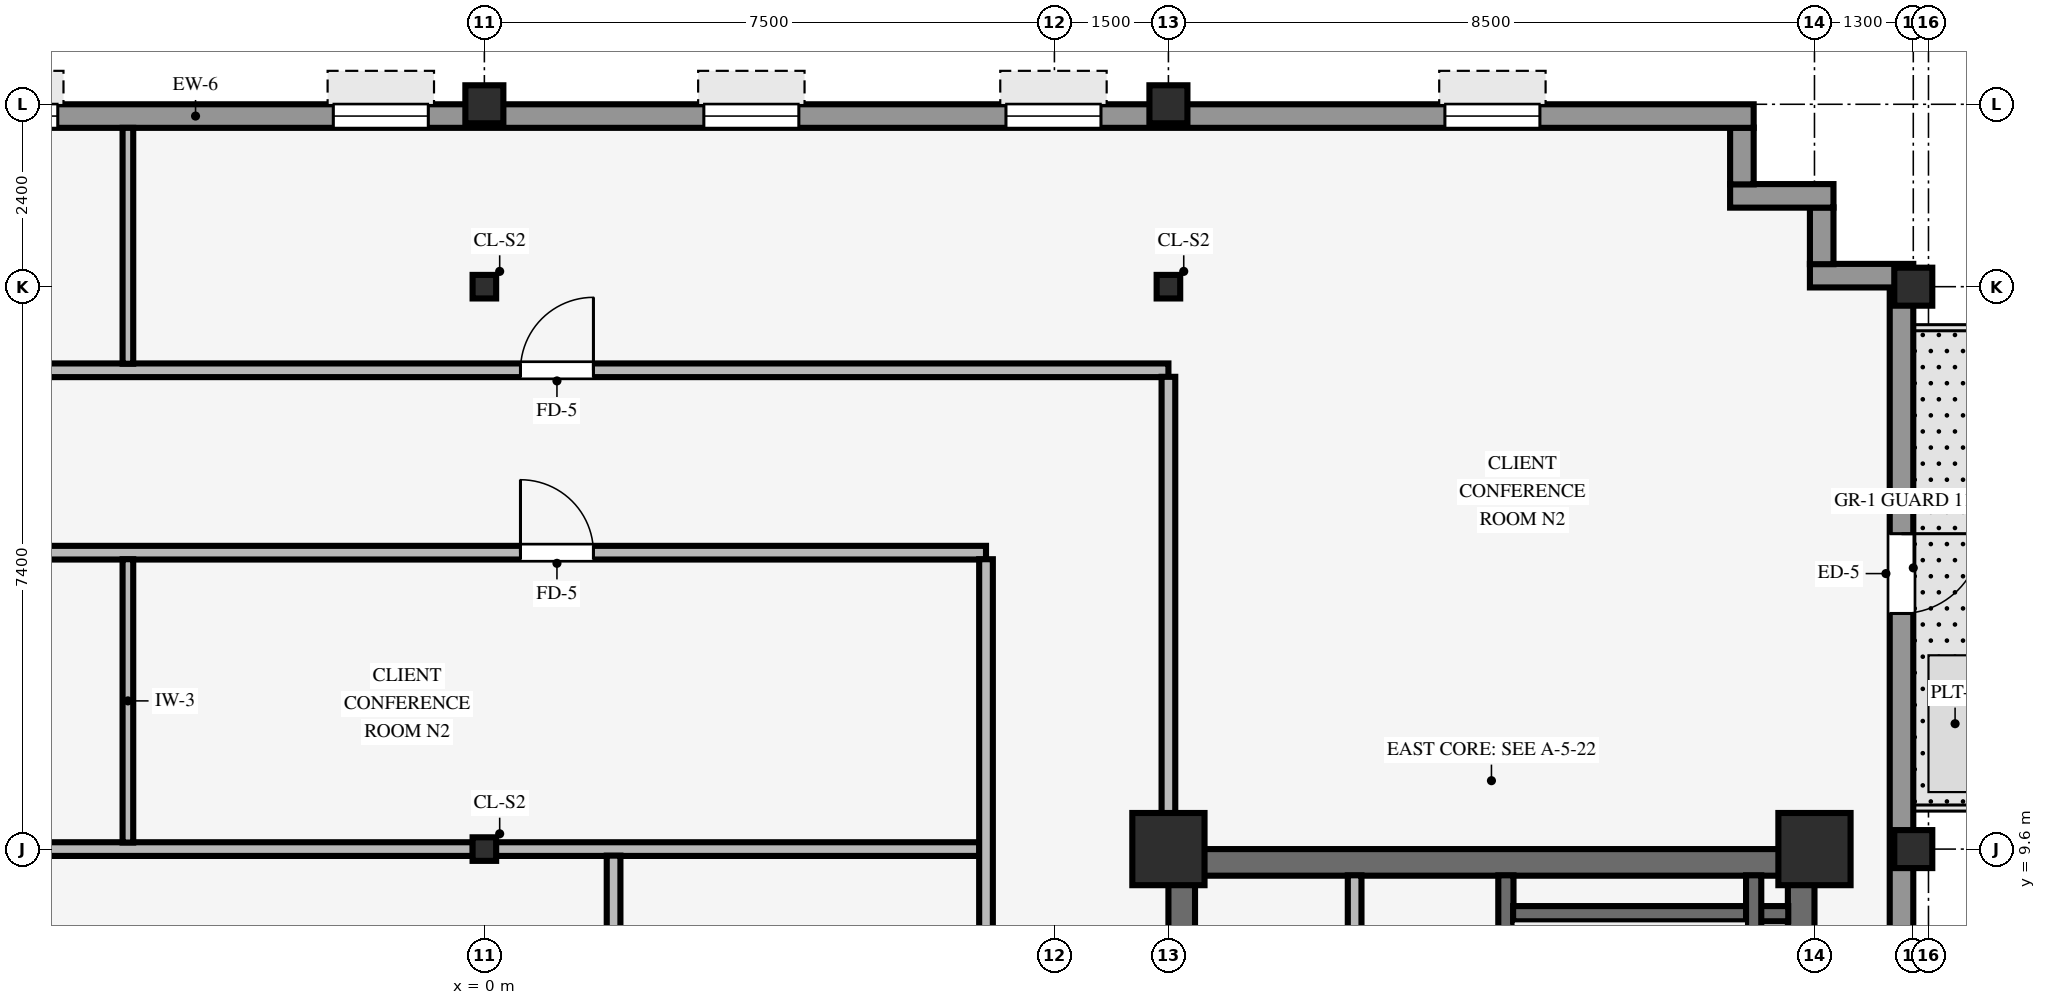
"""IFC4 building model, lengths in metres.
Left out: names, types, materials, properties, quantities, classifications, styles, units other than length and angle.
Written with IfcOpenShell. Run it as: python <this file> out.ifc"""

import sys

from ifc_helpers import new_model, si_unit, direction, frame, frame_2d, origin, origin_2d, place, context, subcontext, project, spatial, rectangle, hollow_rectangle, i_section, extrude, source, transform, mapped, element, fill, save


model = new_model("IFC4")
c1 = context("Model", 3, precision=1e-05, world=origin(), true_north=direction((0.0, 1.0)))
c2 = subcontext(c1, "Body", "Model", "MODEL_VIEW")
j1 = project(units=[si_unit("LENGTHUNIT", "METRE"), si_unit("PLANEANGLEUNIT", "RADIAN")], contexts=[c1])
p1 = place(None, origin())
s1 = spatial("IfcSite", under=j1, at=p1, CompositionType="ELEMENT")
p2 = place(p1, origin())
s2 = spatial("IfcBuilding", under=s1, at=p2, CompositionType="ELEMENT")
p3 = place(p2, frame((0.0, 0.0, 216.45)))
s3 = spatial("IfcBuildingStorey", under=s2, at=p3, CompositionType="ELEMENT", Elevation=216.45)
p4 = place(p3, frame((9.0, 9.425, 0.0), z_axis=(0.0, 0.0, 1.0), x_axis=(1.0, 0.0, 0.0)))
e1 = element("IfcWall", 1, at=p4, inside=s3, PredefinedType="SHEAR", context=c2, shape_type="SweptSolid", body=[
    extrude(rectangle(XDim=8.5, YDim=0.35, at=frame_2d((4.25, 0.0))), origin(), (0.0, 0.0, 1.0), 3.37),
])
p5 = place(p3, frame((9.175, -9.255, 0.0), z_axis=(0.0, 0.0, 1.0), x_axis=(0.0, 1.0, 0.0)))
e2 = element("IfcWall", 2, at=p5, inside=s3, PredefinedType="SHEAR", context=c2, shape_type="SweptSolid", body=[
    extrude(rectangle(XDim=18.51, YDim=0.35, at=frame_2d((9.255, 0.0))), origin(), (0.0, 0.0, 1.0), 3.37),
])
p6 = place(p5, frame((8.655, 0.0, 0.0)))
e3 = element("IfcOpeningElement", 3, at=p6, cuts=e2, PredefinedType="OPENING", context=c2, shape_type="SweptSolid", body=[
    extrude(rectangle(XDim=1.2, YDim=2.15, at=frame_2d((0.6, 1.075))), frame((0.0, 0.185, 0.0), z_axis=(0.0, -1.0, 0.0), x_axis=(1.0, 0.0, 0.0)), (0.0, 0.0, 1.0), 0.37),
])
p7 = place(p3, frame((17.325, -9.255, 0.0), z_axis=(0.0, 0.0, 1.0), x_axis=(0.0, 1.0, 0.0)))
e4 = element("IfcWall", 4, at=p7, inside=s3, PredefinedType="SHEAR", context=c2, shape_type="SweptSolid", body=[
    extrude(rectangle(XDim=18.51, YDim=0.35, at=frame_2d((9.255, 0.0))), origin(), (0.0, 0.0, 1.0), 3.37),
])
for number, where, z_axis, x_axis in (
    (5, (9.0, 9.6, 0.0), (0.0, 0.0, 1.0), (1.0, 0.0, 0.0)),
    (6, (17.5, 9.6, 0.0), (0.0, 0.0, 1.0), (1.0, 0.0, 0.0)),
):
    element("IfcColumn", number, at=place(p3, frame(where, z_axis=z_axis, x_axis=x_axis)), inside=s3, PredefinedType="COLUMN", context=c2, shape_type="SweptSolid", body=[
        extrude(rectangle(XDim=0.95, YDim=0.95, at=origin_2d()), origin(), (0.0, 0.0, 1.0), 3.37),
    ])
for number, where, z_axis, x_axis in (
    (7, (18.8, 9.6, 0.0), (0.0, 0.0, 1.0), (1.0, 0.0, 0.0)),
    (8, (18.8, 17.0, 0.0), (0.0, 0.0, 1.0), (1.0, 0.0, 0.0)),
    (9, (0.0, 19.4, 0.0), (0.0, 0.0, 1.0), (1.0, 0.0, 0.0)),
    (10, (9.0, 19.4, 0.0), (0.0, 0.0, 1.0), (1.0, 0.0, 0.0)),
):
    element("IfcColumn", number, at=place(p3, frame(where, z_axis=z_axis, x_axis=x_axis)), inside=s3, PredefinedType="COLUMN", context=c2, shape_type="SweptSolid", body=[
        extrude(hollow_rectangle(XDim=0.5, YDim=0.5, WallThickness=0.032, InnerFilletRadius=0.032, OuterFilletRadius=0.064, at=origin_2d()), origin(), (0.0, 0.0, 1.0), 3.37),
    ])
for number, where, z_axis, x_axis in (
    (11, (0.0, 9.6, 0.0), (0.0, 0.0, 1.0), (1.0, 0.0, 0.0)),
    (12, (0.0, 17.0, 0.0), (0.0, 0.0, 1.0), (1.0, 0.0, 0.0)),
    (13, (9.0, 17.0, 0.0), (0.0, 0.0, 1.0), (1.0, 0.0, 0.0)),
):
    element("IfcColumn", number, at=place(p3, frame(where, z_axis=z_axis, x_axis=x_axis)), inside=s3, PredefinedType="COLUMN", context=c2, shape_type="SweptSolid", body=[
        extrude(i_section(OverallWidth=0.31, OverallDepth=0.31, WebThickness=0.015, FlangeThickness=0.015, FilletRadius=0.015, at=origin_2d()), origin(), (0.0, 0.0, 1.0), 3.37),
    ])
p8 = place(p3, frame((18.645, -16.994, 0.0), z_axis=(0.0, 0.0, 1.0), x_axis=(0.0, 1.0, 0.0)))
e14 = element("IfcWall", 14, at=p8, inside=s3, PredefinedType="STANDARD", context=c2, shape_type="SweptSolid", body=[
    extrude(rectangle(XDim=33.988, YDim=0.31, at=frame_2d((16.994, 0.0))), origin(), (0.0, 0.0, 1.0), 2.705),
])
p9 = place(p8, frame((30.744, 0.0, 0.0), z_axis=(0.0, 0.0, 1.0), x_axis=(-1.0, 0.0, 0.0)))
e15 = element("IfcOpeningElement", 15, at=p9, cuts=e14, PredefinedType="OPENING", context=c2, shape_type="SweptSolid", body=[
    extrude(rectangle(XDim=1.05, YDim=2.1, at=frame_2d((0.525, 1.05))), frame((0.0, 0.165, 0.0), z_axis=(0.0, -1.0, 0.0), x_axis=(1.0, 0.0, 0.0)), (0.0, 0.0, 1.0), 0.33),
])
p10 = place(p8, frame((2.26, 0.0, 0.8)))
e16 = element("IfcOpeningElement", 16, at=p10, cuts=e14, PredefinedType="OPENING", context=c2, shape_type="SweptSolid", body=[
    extrude(rectangle(XDim=2.05, YDim=1.52, at=frame_2d((1.025, 0.76))), frame((0.0, 0.165, 0.0), z_axis=(0.0, -1.0, 0.0), x_axis=(1.0, 0.0, 0.0)), (0.0, 0.0, 1.0), 0.33),
])
p11 = place(p3, frame((17.44, 17.145, 0.0), z_axis=(0.0, 0.0, 1.0), x_axis=(1.0, 0.0, 0.0)))
e17 = element("IfcWall", 17, at=p11, inside=s3, PredefinedType="STANDARD", context=c2, shape_type="SweptSolid", body=[
    extrude(rectangle(XDim=1.36, YDim=0.31, at=frame_2d((0.68, 0.0))), origin(), (0.0, 0.0, 1.0), 2.816),
])
p12 = place(p3, frame((17.595, 17.296, 0.0), z_axis=(0.0, 0.0, 1.0), x_axis=(0.0, 1.0, 0.0)))
e18 = element("IfcWall", 18, at=p12, inside=s3, PredefinedType="STANDARD", context=c2, shape_type="SweptSolid", body=[
    extrude(rectangle(XDim=0.748, YDim=0.31, at=frame_2d((0.374, 0.0))), origin(), (0.0, 0.0, 1.0), 2.816),
])
p13 = place(p3, frame((16.39, 18.195, 0.0), z_axis=(0.0, 0.0, 1.0), x_axis=(1.0, 0.0, 0.0)))
e19 = element("IfcWall", 19, at=p13, inside=s3, PredefinedType="STANDARD", context=c2, shape_type="SweptSolid", body=[
    extrude(rectangle(XDim=1.36, YDim=0.31, at=frame_2d((0.68, 0.0))), origin(), (0.0, 0.0, 1.0), 2.816),
])
p14 = place(p3, frame((16.545, 18.346, 0.0), z_axis=(0.0, 0.0, 1.0), x_axis=(0.0, 1.0, 0.0)))
e20 = element("IfcWall", 20, at=p14, inside=s3, PredefinedType="STANDARD", context=c2, shape_type="SweptSolid", body=[
    extrude(rectangle(XDim=0.748, YDim=0.31, at=frame_2d((0.374, 0.0))), origin(), (0.0, 0.0, 1.0), 2.816),
])
p15 = place(p3, frame((-24.3, 19.245, 0.0), z_axis=(0.0, 0.0, 1.0), x_axis=(1.0, 0.0, 0.0)))
e21 = element("IfcWall", 21, at=p15, inside=s3, PredefinedType="STANDARD", context=c2, shape_type="SweptSolid", body=[
    extrude(rectangle(XDim=41.0, YDim=0.31, at=frame_2d((20.5, 0.0))), origin(), (0.0, 0.0, 1.0), 2.705),
])
p16 = place(p15, frame((2.812, 0.0, 0.8)))
e22 = element("IfcOpeningElement", 22, at=p16, cuts=e21, PredefinedType="OPENING", context=c2, shape_type="SweptSolid", body=[
    extrude(rectangle(XDim=1.25, YDim=1.52, at=frame_2d((0.625, 0.76))), frame((0.0, 0.165, 0.0), z_axis=(0.0, -1.0, 0.0), x_axis=(1.0, 0.0, 0.0)), (0.0, 0.0, 1.0), 0.33),
])
p17 = place(p15, frame((7.688, 0.0, 0.8)))
e23 = element("IfcOpeningElement", 23, at=p17, cuts=e21, PredefinedType="OPENING", context=c2, shape_type="SweptSolid", body=[
    extrude(rectangle(XDim=1.25, YDim=1.52, at=frame_2d((0.625, 0.76))), frame((0.0, 0.165, 0.0), z_axis=(0.0, -1.0, 0.0), x_axis=(1.0, 0.0, 0.0)), (0.0, 0.0, 1.0), 0.33),
])
p18 = place(p15, frame((12.562, 0.0, 0.8)))
e24 = element("IfcOpeningElement", 24, at=p18, cuts=e21, PredefinedType="OPENING", context=c2, shape_type="SweptSolid", body=[
    extrude(rectangle(XDim=1.25, YDim=1.52, at=frame_2d((0.625, 0.76))), frame((0.0, 0.165, 0.0), z_axis=(0.0, -1.0, 0.0), x_axis=(1.0, 0.0, 0.0)), (0.0, 0.0, 1.0), 0.33),
])
p19 = place(p15, frame((17.438, 0.0, 0.8)))
e25 = element("IfcOpeningElement", 25, at=p19, cuts=e21, PredefinedType="OPENING", context=c2, shape_type="SweptSolid", body=[
    extrude(rectangle(XDim=1.25, YDim=1.52, at=frame_2d((0.625, 0.76))), frame((0.0, 0.165, 0.0), z_axis=(0.0, -1.0, 0.0), x_axis=(1.0, 0.0, 0.0)), (0.0, 0.0, 1.0), 0.33),
])
p20 = place(p15, frame((22.312, 0.0, 0.8)))
e26 = element("IfcOpeningElement", 26, at=p20, cuts=e21, PredefinedType="OPENING", context=c2, shape_type="SweptSolid", body=[
    extrude(rectangle(XDim=1.25, YDim=1.52, at=frame_2d((0.625, 0.76))), frame((0.0, 0.165, 0.0), z_axis=(0.0, -1.0, 0.0), x_axis=(1.0, 0.0, 0.0)), (0.0, 0.0, 1.0), 0.33),
])
p21 = place(p15, frame((27.188, 0.0, 0.8)))
e27 = element("IfcOpeningElement", 27, at=p21, cuts=e21, PredefinedType="OPENING", context=c2, shape_type="SweptSolid", body=[
    extrude(rectangle(XDim=1.25, YDim=1.52, at=frame_2d((0.625, 0.76))), frame((0.0, 0.165, 0.0), z_axis=(0.0, -1.0, 0.0), x_axis=(1.0, 0.0, 0.0)), (0.0, 0.0, 1.0), 0.33),
])
p22 = place(p15, frame((31.163, 0.0, 0.8)))
e28 = element("IfcOpeningElement", 28, at=p22, cuts=e21, PredefinedType="OPENING", context=c2, shape_type="SweptSolid", body=[
    extrude(rectangle(XDim=1.25, YDim=1.52, at=frame_2d((0.625, 0.76))), frame((0.0, 0.165, 0.0), z_axis=(0.0, -1.0, 0.0), x_axis=(1.0, 0.0, 0.0)), (0.0, 0.0, 1.0), 0.33),
])
p23 = place(p15, frame((36.938, 0.0, 0.8)))
e29 = element("IfcOpeningElement", 29, at=p23, cuts=e21, PredefinedType="OPENING", context=c2, shape_type="SweptSolid", body=[
    extrude(rectangle(XDim=1.25, YDim=1.52, at=frame_2d((0.625, 0.76))), frame((0.0, 0.165, 0.0), z_axis=(0.0, -1.0, 0.0), x_axis=(1.0, 0.0, 0.0)), (0.0, 0.0, 1.0), 0.33),
])
p24 = place(p3, frame((13.44, 0.9, 0.0), z_axis=(0.0, 0.0, 1.0), x_axis=(0.0, 1.0, 0.0)))
e30 = element("IfcWall", 30, at=p24, inside=s3, PredefinedType="SHEAR", context=c2, shape_type="SweptSolid", body=[
    extrude(rectangle(XDim=8.355, YDim=0.2, at=frame_2d((4.177, 0.0))), origin(), (0.0, 0.0, 1.0), 3.37),
])
p25 = place(p24, frame((0.43, 0.0, 0.0)))
e31 = element("IfcOpeningElement", 31, at=p25, cuts=e30, PredefinedType="OPENING", context=c2, shape_type="SweptSolid", body=[
    extrude(rectangle(XDim=1.1, YDim=2.15, at=frame_2d((0.55, 1.075))), frame((0.0, 0.11, 0.0), z_axis=(0.0, -1.0, 0.0), x_axis=(1.0, 0.0, 0.0)), (0.0, 0.0, 1.0), 0.22),
])
p26 = place(p3, frame((13.535, 8.75, 0.0), z_axis=(0.0, 0.0, 1.0), x_axis=(1.0, 0.0, 0.0)))
e32 = element("IfcWall", 32, at=p26, inside=s3, PredefinedType="SHEAR", context=c2, shape_type="SweptSolid", body=[
    extrude(rectangle(XDim=3.62, YDim=0.2, at=frame_2d((1.81, 0.0))), origin(), (0.0, 0.0, 1.0), 3.37),
])
p27 = place(p3, frame((16.7, 1.095, 0.0), z_axis=(0.0, 0.0, 1.0), x_axis=(0.0, 1.0, 0.0)))
e33 = element("IfcWall", 33, at=p27, inside=s3, PredefinedType="SHEAR", context=c2, shape_type="SweptSolid", body=[
    extrude(rectangle(XDim=8.16, YDim=0.2, at=frame_2d((4.08, 0.0))), origin(), (0.0, 0.0, 1.0), 3.37),
])
p28 = place(p3, frame((11.45, 1.49, 0.0), z_axis=(0.0, 0.0, 1.0), x_axis=(0.0, 1.0, 0.0)))
e34 = element("IfcWall", 34, at=p28, inside=s3, PredefinedType="PARTITIONING", context=c2, shape_type="SweptSolid", body=[
    extrude(rectangle(XDim=7.765, YDim=0.18, at=frame_2d((3.882, 0.0))), origin(), (0.0, 0.0, 1.0), 3.36),
])
p29 = place(p3, frame((-8.529, 9.6, 0.0), z_axis=(0.0, 0.0, 1.0), x_axis=(1.0, 0.0, 0.0)))
e35 = element("IfcWall", 35, at=p29, inside=s3, PredefinedType="PARTITIONING", context=c2, shape_type="SweptSolid", body=[
    extrude(rectangle(XDim=8.378, YDim=0.18, at=frame_2d((4.189, 0.0))), origin(), (0.0, 0.0, 1.0), 2.405),
])
p30 = place(p3, frame((0.151, 9.6, 0.0), z_axis=(0.0, 0.0, 1.0), x_axis=(1.0, 0.0, 0.0)))
e36 = element("IfcWall", 36, at=p30, inside=s3, PredefinedType="PARTITIONING", context=c2, shape_type="SweptSolid", body=[
    extrude(rectangle(XDim=6.363, YDim=0.18, at=frame_2d((3.182, 0.0))), origin(), (0.0, 0.0, 1.0), 2.405),
])
p31 = place(p3, frame((-17.7, 13.5, 0.0), z_axis=(0.0, 0.0, 1.0), x_axis=(1.0, 0.0, 0.0)))
e37 = element("IfcWall", 37, at=p31, inside=s3, PredefinedType="PARTITIONING", context=c2, shape_type="SweptSolid", body=[
    extrude(rectangle(XDim=24.3, YDim=0.18, at=frame_2d((12.15, 0.0))), origin(), (0.0, 0.0, 1.0), 3.008),
])
p32 = place(p31, frame((6.025, 0.0, 0.0)))
e38 = element("IfcOpeningElement", 38, at=p32, cuts=e37, PredefinedType="OPENING", context=c2, shape_type="SweptSolid", body=[
    extrude(rectangle(XDim=0.96, YDim=2.1, at=frame_2d((0.48, 1.05))), frame((0.0, 0.1, 0.0), z_axis=(0.0, -1.0, 0.0), x_axis=(1.0, 0.0, 0.0)), (0.0, 0.0, 1.0), 0.2),
])
p33 = place(p31, frame((18.175, 0.0, 0.0)))
e39 = element("IfcOpeningElement", 39, at=p33, cuts=e37, PredefinedType="OPENING", context=c2, shape_type="SweptSolid", body=[
    extrude(rectangle(XDim=0.96, YDim=2.1, at=frame_2d((0.48, 1.05))), frame((0.0, 0.1, 0.0), z_axis=(0.0, -1.0, 0.0), x_axis=(1.0, 0.0, 0.0)), (0.0, 0.0, 1.0), 0.2),
])
p34 = place(p3, frame((-26.09, 15.9, 0.0), z_axis=(0.0, 0.0, 1.0), x_axis=(1.0, 0.0, 0.0)))
e40 = element("IfcWall", 40, at=p34, inside=s3, PredefinedType="PARTITIONING", context=c2, shape_type="SweptSolid", body=[
    extrude(rectangle(XDim=35.09, YDim=0.18, at=frame_2d((17.545, 0.0))), origin(), (0.0, 0.0, 1.0), 3.36),
])
p35 = place(p34, frame((14.415, 0.0, 0.0)))
e41 = element("IfcOpeningElement", 41, at=p35, cuts=e40, PredefinedType="OPENING", context=c2, shape_type="SweptSolid", body=[
    extrude(rectangle(XDim=0.96, YDim=2.1, at=frame_2d((0.48, 1.05))), frame((0.0, 0.1, 0.0), z_axis=(0.0, -1.0, 0.0), x_axis=(1.0, 0.0, 0.0)), (0.0, 0.0, 1.0), 0.2),
])
p36 = place(p34, frame((26.565, 0.0, 0.0)))
e42 = element("IfcOpeningElement", 42, at=p36, cuts=e40, PredefinedType="OPENING", context=c2, shape_type="SweptSolid", body=[
    extrude(rectangle(XDim=0.96, YDim=2.1, at=frame_2d((0.48, 1.05))), frame((0.0, 0.1, 0.0), z_axis=(0.0, -1.0, 0.0), x_axis=(1.0, 0.0, 0.0)), (0.0, 0.0, 1.0), 0.2),
])
p37 = place(p3, frame((-4.69, 9.686, 0.0), z_axis=(0.0, 0.0, 1.0), x_axis=(0.0, 1.0, 0.0)))
e43 = element("IfcWall", 43, at=p37, inside=s3, PredefinedType="PARTITIONING", context=c2, shape_type="SweptSolid", body=[
    extrude(rectangle(XDim=3.728, YDim=0.14, at=frame_2d((1.864, 0.0))), origin(), (0.0, 0.0, 1.0), 3.36),
])
p38 = place(p3, frame((-4.69, 15.986, 0.0), z_axis=(0.0, 0.0, 1.0), x_axis=(0.0, 1.0, 0.0)))
e44 = element("IfcWall", 44, at=p38, inside=s3, PredefinedType="PARTITIONING", context=c2, shape_type="SweptSolid", body=[
    extrude(rectangle(XDim=3.104, YDim=0.14, at=frame_2d((1.552, 0.0))), origin(), (0.0, 0.0, 1.0), 3.36),
])
p39 = place(p3, frame((1.7, 1.336, 0.0), z_axis=(0.0, 0.0, 1.0), x_axis=(0.0, 1.0, 0.0)))
e45 = element("IfcWall", 45, at=p39, inside=s3, PredefinedType="PARTITIONING", context=c2, shape_type="SweptSolid", body=[
    extrude(rectangle(XDim=8.178, YDim=0.18, at=frame_2d((4.089, 0.0))), origin(), (0.0, 0.0, 1.0), 3.36),
])
p40 = place(p3, frame((6.6, 1.336, 0.0), z_axis=(0.0, 0.0, 1.0), x_axis=(0.0, 1.0, 0.0)))
e46 = element("IfcWall", 46, at=p40, inside=s3, PredefinedType="PARTITIONING", context=c2, shape_type="SweptSolid", body=[
    extrude(rectangle(XDim=12.078, YDim=0.18, at=frame_2d((6.039, 0.0))), origin(), (0.0, 0.0, 1.0), 3.36),
])
p41 = place(p40, frame((3.652, 0.0, 0.0)))
e47 = element("IfcOpeningElement", 47, at=p41, cuts=e46, PredefinedType="OPENING", context=c2, shape_type="SweptSolid", body=[
    extrude(rectangle(XDim=0.96, YDim=2.1, at=frame_2d((0.48, 1.05))), frame((0.0, 0.1, 0.0), z_axis=(0.0, -1.0, 0.0), x_axis=(1.0, 0.0, 0.0)), (0.0, 0.0, 1.0), 0.2),
])
p42 = place(p3, frame((9.0, 10.071, 0.0), z_axis=(0.0, 0.0, 1.0), x_axis=(0.0, 1.0, 0.0)))
e48 = element("IfcWall", 48, at=p42, inside=s3, PredefinedType="PARTITIONING", context=c2, shape_type="SweptSolid", body=[
    extrude(rectangle(XDim=5.743, YDim=0.18, at=frame_2d((2.872, 0.0))), origin(), (0.0, 0.0, 1.0), 2.816),
])
m1 = source(origin(), c2, "Body", "SweptSolid", [
    extrude(rectangle(XDim=1.05, YDim=2.1, at=frame_2d((0.525, 1.05))), frame((0.0, 0.025, 0.0), z_axis=(0.0, -1.0, 0.0), x_axis=(1.0, 0.0, 0.0)), (0.0, 0.0, 1.0), 0.05),
])
p43 = place(p9, origin())
e49 = element("IfcDoor", 49, at=p43, inside=s3, OperationType="SINGLE_SWING_LEFT", PredefinedType="DOOR", context=c2, shape_type="MappedRepresentation", body=[
    mapped(m1, transform((0.0, 0.0, 0.0), scale=1.0)),
])
fill(e15, e49)
m2 = source(origin(), c2, "Body", "SweptSolid", [
    extrude(rectangle(XDim=1.25, YDim=1.52, at=frame_2d((0.625, 0.76))), frame((0.0, 0.03, 0.0), z_axis=(0.0, -1.0, 0.0), x_axis=(1.0, 0.0, 0.0)), (0.0, 0.0, 1.0), 0.06),
])
p44 = place(p19, origin())
e50 = element("IfcWindow", 50, at=p44, inside=s3, PartitioningType="SINGLE_PANEL", PredefinedType="WINDOW", context=c2, shape_type="MappedRepresentation", body=[
    mapped(m2, transform((0.0, 0.0, 0.0), scale=1.0)),
])
fill(e25, e50)
p45 = place(p20, origin())
e51 = element("IfcWindow", 51, at=p45, inside=s3, PartitioningType="SINGLE_PANEL", PredefinedType="WINDOW", context=c2, shape_type="MappedRepresentation", body=[
    mapped(m2, transform((0.0, 0.0, 0.0), scale=1.0)),
])
fill(e26, e51)
p46 = place(p21, origin())
e52 = element("IfcWindow", 52, at=p46, inside=s3, PartitioningType="SINGLE_PANEL", PredefinedType="WINDOW", context=c2, shape_type="MappedRepresentation", body=[
    mapped(m2, transform((0.0, 0.0, 0.0), scale=1.0)),
])
fill(e27, e52)
p47 = place(p22, origin())
e53 = element("IfcWindow", 53, at=p47, inside=s3, PartitioningType="SINGLE_PANEL", PredefinedType="WINDOW", context=c2, shape_type="MappedRepresentation", body=[
    mapped(m2, transform((0.0, 0.0, 0.0), scale=1.0)),
])
fill(e28, e53)
p48 = place(p23, origin())
e54 = element("IfcWindow", 54, at=p48, inside=s3, PartitioningType="SINGLE_PANEL", PredefinedType="WINDOW", context=c2, shape_type="MappedRepresentation", body=[
    mapped(m2, transform((0.0, 0.0, 0.0), scale=1.0)),
])
fill(e29, e54)
m3 = source(origin(), c2, "Body", "SweptSolid", [
    extrude(rectangle(XDim=0.96, YDim=2.1, at=frame_2d((0.48, 1.05))), frame((0.0, 0.025, 0.0), z_axis=(0.0, -1.0, 0.0), x_axis=(1.0, 0.0, 0.0)), (0.0, 0.0, 1.0), 0.05),
])
p49 = place(p36, origin())
e55 = element("IfcDoor", 55, at=p49, inside=s3, OperationType="SINGLE_SWING_RIGHT", PredefinedType="DOOR", context=c2, shape_type="MappedRepresentation", body=[
    mapped(m3, transform((0.0, 0.0, 0.0), scale=1.0)),
])
fill(e42, e55)
p50 = place(p33, origin())
e56 = element("IfcDoor", 56, at=p50, inside=s3, OperationType="SINGLE_SWING_LEFT", PredefinedType="DOOR", context=c2, shape_type="MappedRepresentation", body=[
    mapped(m3, transform((0.0, 0.0, 0.0), scale=1.0)),
])
fill(e39, e56)
save(model, sys.argv[1])
